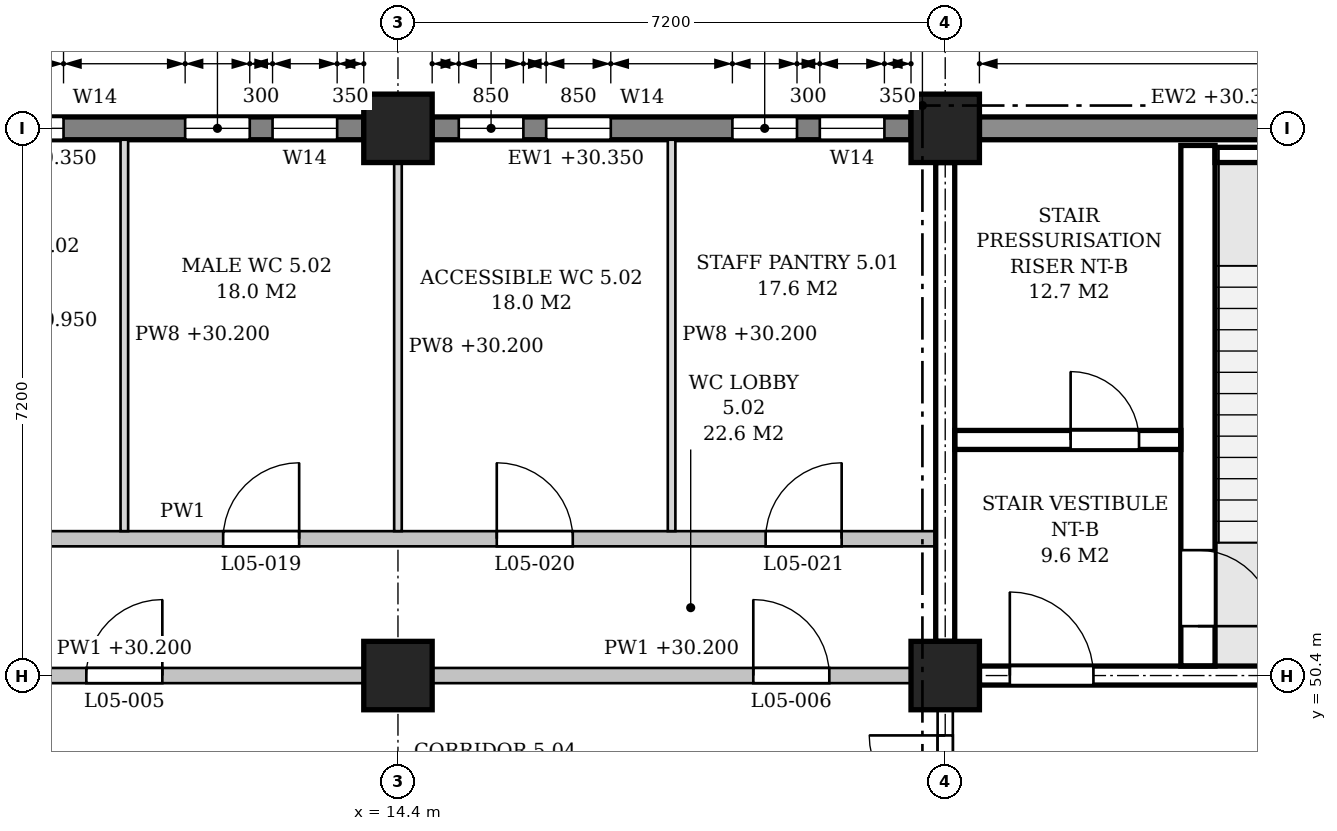
"""IFC4 building model, lengths in metres.
Left out: names, types, materials, properties, quantities, classifications, styles, units other than length and angle.
Written with IfcOpenShell. Run it as: python <this file> out.ifc"""

import sys

from ifc_helpers import new_model, si_unit, direction, frame, frame_2d, origin, origin_2d, place, context, subcontext, project, spatial, polyline, rectangle, outline, extrude, element, fill, save


model = new_model("IFC4")
c1 = context("Model", 3, precision=1e-05, world=origin(), true_north=direction((0.0, 1.0)))
c2 = subcontext(c1, "Body", "Model", "MODEL_VIEW")
j1 = project(units=[si_unit("LENGTHUNIT", "METRE"), si_unit("PLANEANGLEUNIT", "RADIAN")], contexts=[c1])
p1 = place(None, origin())
s1 = spatial("IfcSite", under=j1, at=p1, CompositionType="ELEMENT")
p2 = place(p1, origin())
s2 = spatial("IfcBuilding", under=s1, at=p2, CompositionType="ELEMENT")
p3 = place(p2, frame((0.0, 0.0, 26.4)))
s3 = spatial("IfcBuildingStorey", under=s2, at=p3, CompositionType="ELEMENT", Elevation=26.4)
for number, where, z_axis, x_axis in (
    (1, (14.4, 50.4, 0.0), (0.0, 0.0, 1.0), (1.0, 0.0, 0.0)),
    (2, (14.4, 57.6, 0.0), (0.0, 0.0, 1.0), (1.0, 0.0, 0.0)),
    (3, (21.6, 50.4, 0.0), (0.0, 0.0, 1.0), (1.0, 0.0, 0.0)),
    (4, (21.6, 57.6, 0.0), (0.0, 0.0, 1.0), (1.0, 0.0, 0.0)),
):
    element("IfcColumn", number, at=place(p3, frame(where, z_axis=z_axis, x_axis=x_axis)), inside=s3, PredefinedType="COLUMN", context=c2, shape_type="SweptSolid", body=[
        extrude(rectangle(XDim=0.9, YDim=0.9, at=origin_2d()), origin(), (0.0, 0.0, 1.0), 4.8),
    ])
p4 = place(p3, frame((28.35, 57.6, 0.0), z_axis=(0.0, 0.0, 1.0), x_axis=(-1.0, 0.0, 0.0)))
e5 = element("IfcWall", 5, at=p4, inside=s3, PredefinedType="STANDARD", context=c2, shape_type="SweptSolid", body=[
    extrude(rectangle(XDim=6.3, YDim=0.3, at=frame_2d((3.15, 0.0))), origin(), (0.0, 0.0, 1.0), 3.95),
])
p5 = place(p4, frame((0.9, 0.0, 0.9)))
e6 = element("IfcOpeningElement", 6, at=p5, cuts=e5, PredefinedType="OPENING", context=c2, shape_type="SweptSolid", body=[
    extrude(outline(polyline([(0.0, 0.0), (0.9, 0.0), (0.9, 2.05), (0.45, 2.5), (0.0, 2.05), (0.0, 0.0)])), frame((0.0, 0.16, 0.0), z_axis=(0.0, -1.0, 0.0), x_axis=(1.0, 0.0, 0.0)), (0.0, 0.0, 1.0), 0.32),
])
p6 = place(p3, frame((21.15, 57.6, 0.0), z_axis=(0.0, 0.0, 1.0), x_axis=(-1.0, 0.0, 0.0)))
e7 = element("IfcWall", 7, at=p6, inside=s3, PredefinedType="STANDARD", context=c2, shape_type="SweptSolid", body=[
    extrude(rectangle(XDim=6.3, YDim=0.3, at=frame_2d((3.15, 0.0))), origin(), (0.0, 0.0, 1.0), 3.95),
])
p7 = place(p6, frame((0.35, 0.0, 0.9)))
e8 = element("IfcOpeningElement", 8, at=p7, cuts=e7, PredefinedType="OPENING", context=c2, shape_type="SweptSolid", body=[
    extrude(outline(polyline([(0.0, 0.0), (0.85, 0.0), (0.85, 2.05), (0.425, 2.5), (0.0, 2.05), (0.0, 0.0)])), frame((0.0, 0.16, 0.0), z_axis=(0.0, -1.0, 0.0), x_axis=(1.0, 0.0, 0.0)), (0.0, 0.0, 1.0), 0.32),
])
p8 = place(p6, frame((1.5, 0.0, 0.9)))
e9 = element("IfcOpeningElement", 9, at=p8, cuts=e7, PredefinedType="OPENING", context=c2, shape_type="SweptSolid", body=[
    extrude(outline(polyline([(0.0, 0.0), (0.85, 0.0), (0.85, 2.05), (0.425, 2.5), (0.0, 2.05), (0.0, 0.0)])), frame((0.0, 0.16, 0.0), z_axis=(0.0, -1.0, 0.0), x_axis=(1.0, 0.0, 0.0)), (0.0, 0.0, 1.0), 0.32),
])
p9 = place(p6, frame((3.95, 0.0, 0.9)))
e10 = element("IfcOpeningElement", 10, at=p9, cuts=e7, PredefinedType="OPENING", context=c2, shape_type="SweptSolid", body=[
    extrude(outline(polyline([(0.0, 0.0), (0.85, 0.0), (0.85, 2.05), (0.425, 2.5), (0.0, 2.05), (0.0, 0.0)])), frame((0.0, 0.16, 0.0), z_axis=(0.0, -1.0, 0.0), x_axis=(1.0, 0.0, 0.0)), (0.0, 0.0, 1.0), 0.32),
])
p10 = place(p6, frame((5.1, 0.0, 0.9)))
e11 = element("IfcOpeningElement", 11, at=p10, cuts=e7, PredefinedType="OPENING", context=c2, shape_type="SweptSolid", body=[
    extrude(outline(polyline([(0.0, 0.0), (0.85, 0.0), (0.85, 2.05), (0.425, 2.5), (0.0, 2.05), (0.0, 0.0)])), frame((0.0, 0.16, 0.0), z_axis=(0.0, -1.0, 0.0), x_axis=(1.0, 0.0, 0.0)), (0.0, 0.0, 1.0), 0.32),
])
p11 = place(p3, frame((13.95, 57.6, 0.0), z_axis=(0.0, 0.0, 1.0), x_axis=(-1.0, 0.0, 0.0)))
e12 = element("IfcWall", 12, at=p11, inside=s3, PredefinedType="STANDARD", context=c2, shape_type="SweptSolid", body=[
    extrude(rectangle(XDim=6.3, YDim=0.3, at=frame_2d((3.15, 0.0))), origin(), (0.0, 0.0, 1.0), 3.95),
])
p12 = place(p11, frame((0.35, 0.0, 0.9)))
e13 = element("IfcOpeningElement", 13, at=p12, cuts=e12, PredefinedType="OPENING", context=c2, shape_type="SweptSolid", body=[
    extrude(outline(polyline([(0.0, 0.0), (0.85, 0.0), (0.85, 2.05), (0.425, 2.5), (0.0, 2.05), (0.0, 0.0)])), frame((0.0, 0.16, 0.0), z_axis=(0.0, -1.0, 0.0), x_axis=(1.0, 0.0, 0.0)), (0.0, 0.0, 1.0), 0.32),
])
p13 = place(p11, frame((1.5, 0.0, 0.9)))
e14 = element("IfcOpeningElement", 14, at=p13, cuts=e12, PredefinedType="OPENING", context=c2, shape_type="SweptSolid", body=[
    extrude(outline(polyline([(0.0, 0.0), (0.85, 0.0), (0.85, 2.05), (0.425, 2.5), (0.0, 2.05), (0.0, 0.0)])), frame((0.0, 0.16, 0.0), z_axis=(0.0, -1.0, 0.0), x_axis=(1.0, 0.0, 0.0)), (0.0, 0.0, 1.0), 0.32),
])
p14 = place(p11, frame((3.95, 0.0, 0.9)))
e15 = element("IfcOpeningElement", 15, at=p14, cuts=e12, PredefinedType="OPENING", context=c2, shape_type="SweptSolid", body=[
    extrude(outline(polyline([(0.0, 0.0), (0.85, 0.0), (0.85, 2.05), (0.425, 2.5), (0.0, 2.05), (0.0, 0.0)])), frame((0.0, 0.16, 0.0), z_axis=(0.0, -1.0, 0.0), x_axis=(1.0, 0.0, 0.0)), (0.0, 0.0, 1.0), 0.32),
])
p15 = place(p11, frame((5.1, 0.0, 0.9)))
e16 = element("IfcOpeningElement", 16, at=p15, cuts=e12, PredefinedType="OPENING", context=c2, shape_type="SweptSolid", body=[
    extrude(outline(polyline([(0.0, 0.0), (0.85, 0.0), (0.85, 2.05), (0.425, 2.5), (0.0, 2.05), (0.0, 0.0)])), frame((0.0, 0.16, 0.0), z_axis=(0.0, -1.0, 0.0), x_axis=(1.0, 0.0, 0.0)), (0.0, 0.0, 1.0), 0.32),
])
p16 = place(p3, frame((22.05, 50.4, 0.0), z_axis=(0.0, 0.0, 1.0), x_axis=(1.0, 0.0, 0.0)))
e17 = element("IfcWall", 17, at=p16, inside=s3, PredefinedType="SHEAR", context=c2, shape_type="SweptSolid", body=[
    extrude(rectangle(XDim=6.3, YDim=0.25, at=frame_2d((3.15, 0.0))), origin(), (0.0, 0.0, 1.0), 3.8),
])
p17 = place(p16, frame((0.4, 0.0, 0.0)))
e18 = element("IfcOpeningElement", 18, at=p17, cuts=e17, PredefinedType="OPENING", context=c2, shape_type="SweptSolid", body=[
    extrude(rectangle(XDim=1.1, YDim=2.1, at=frame_2d((0.55, 1.05))), frame((0.0, 0.135, 0.0), z_axis=(0.0, -1.0, 0.0), x_axis=(1.0, 0.0, 0.0)), (0.0, 0.0, 1.0), 0.27),
])
p18 = place(p3, frame((21.6, 50.85, 0.0), z_axis=(0.0, 0.0, 1.0), x_axis=(0.0, 1.0, 0.0)))
e19 = element("IfcWall", 19, at=p18, inside=s3, PredefinedType="SHEAR", context=c2, shape_type="SweptSolid", body=[
    extrude(rectangle(XDim=6.3, YDim=0.25, at=frame_2d((3.15, 0.0))), origin(), (0.0, 0.0, 1.0), 3.8),
])
p19 = place(p3, frame((25.15, 57.25, -0.25), z_axis=(0.0, 0.0, 1.0), x_axis=(1.0, 0.0, 0.0)))
e20 = element("IfcWall", 20, at=p19, inside=s3, PredefinedType="SHEAR", context=c2, shape_type="SweptSolid", body=[
    extrude(rectangle(XDim=1.4, YDim=0.2, at=frame_2d((0.7, 0.0))), origin(), (0.0, 0.0, 1.0), 4.8),
])
p20 = place(p3, frame((24.925, 50.525, 0.0), z_axis=(0.0, 0.0, 1.0), x_axis=(0.0, 1.0, 0.0)))
e21 = element("IfcWall", 21, at=p20, inside=s3, PredefinedType="SHEAR", context=c2, shape_type="SweptSolid", body=[
    extrude(rectangle(XDim=6.85, YDim=0.45, at=frame_2d((3.425, 0.0))), origin(), (0.0, 0.0, 1.0), 4.55),
])
p21 = place(p20, frame((0.525, 0.0, 0.0)))
e22 = element("IfcOpeningElement", 22, at=p21, cuts=e21, PredefinedType="OPENING", context=c2, shape_type="SweptSolid", body=[
    extrude(rectangle(XDim=1.0, YDim=2.1, at=frame_2d((0.5, 1.05))), frame((0.0, 0.235, 0.0), z_axis=(0.0, -1.0, 0.0), x_axis=(1.0, 0.0, 0.0)), (0.0, 0.0, 1.0), 0.47),
])
p22 = place(p3, frame((21.725, 53.5, 0.0), z_axis=(0.0, 0.0, 1.0), x_axis=(1.0, 0.0, 0.0)))
e23 = element("IfcWall", 23, at=p22, inside=s3, PredefinedType="SHEAR", context=c2, shape_type="SweptSolid", body=[
    extrude(rectangle(XDim=2.975, YDim=0.25, at=frame_2d((1.487, 0.0))), origin(), (0.0, 0.0, 1.0), 4.55),
])
p23 = place(p22, frame((1.525, 0.0, 0.0)))
e24 = element("IfcOpeningElement", 24, at=p23, cuts=e23, PredefinedType="OPENING", context=c2, shape_type="SweptSolid", body=[
    extrude(rectangle(XDim=0.9, YDim=2.1, at=frame_2d((0.45, 1.05))), frame((0.0, 0.135, 0.0), z_axis=(0.0, -1.0, 0.0), x_axis=(1.0, 0.0, 0.0)), (0.0, 0.0, 1.0), 0.27),
])
p24 = place(p3, frame((7.65, 50.4, 0.0), z_axis=(0.0, 0.0, 1.0), x_axis=(1.0, 0.0, 0.0)))
e25 = element("IfcWall", 25, at=p24, inside=s3, PredefinedType="PARTITIONING", context=c2, shape_type="SweptSolid", body=[
    extrude(rectangle(XDim=6.3, YDim=0.2, at=frame_2d((3.15, 0.0))), origin(), (0.0, 0.0, 1.0), 3.8),
])
p25 = place(p24, frame((2.65, 0.0, 0.0)))
e26 = element("IfcOpeningElement", 26, at=p25, cuts=e25, PredefinedType="OPENING", context=c2, shape_type="SweptSolid", body=[
    extrude(rectangle(XDim=1.0, YDim=2.1, at=frame_2d((0.5, 1.05))), frame((0.0, 0.11, 0.0), z_axis=(0.0, -1.0, 0.0), x_axis=(1.0, 0.0, 0.0)), (0.0, 0.0, 1.0), 0.22),
])
p26 = place(p3, frame((14.85, 50.4, 0.0), z_axis=(0.0, 0.0, 1.0), x_axis=(1.0, 0.0, 0.0)))
e27 = element("IfcWall", 27, at=p26, inside=s3, PredefinedType="PARTITIONING", context=c2, shape_type="SweptSolid", body=[
    extrude(rectangle(XDim=6.3, YDim=0.2, at=frame_2d((3.15, 0.0))), origin(), (0.0, 0.0, 1.0), 3.8),
])
p27 = place(p26, frame((4.225, 0.0, 0.0)))
e28 = element("IfcOpeningElement", 28, at=p27, cuts=e27, PredefinedType="OPENING", context=c2, shape_type="SweptSolid", body=[
    extrude(rectangle(XDim=1.0, YDim=2.1, at=frame_2d((0.5, 1.05))), frame((0.0, 0.11, 0.0), z_axis=(0.0, -1.0, 0.0), x_axis=(1.0, 0.0, 0.0)), (0.0, 0.0, 1.0), 0.22),
])
p28 = place(p3, frame((7.325, 52.2, 0.0), z_axis=(0.0, 0.0, 1.0), x_axis=(1.0, 0.0, 0.0)))
e29 = element("IfcWall", 29, at=p28, inside=s3, PredefinedType="PARTITIONING", context=c2, shape_type="SweptSolid", body=[
    extrude(outline(polyline([(0.0, 0.0), (14.15, 0.0), (14.15, 3.8), (14.025, 3.8), (14.025, 4.55), (7.325, 4.55), (7.325, 3.8), (6.825, 3.8), (6.825, 4.55), (0.125, 4.55), (0.125, 3.8), (0.0, 3.8), (0.0, 0.0)])), frame((0.0, 0.1, 0.0), z_axis=(0.0, -1.0, 0.0), x_axis=(1.0, 0.0, 0.0)), (0.0, 0.0, 1.0), 0.2),
])
p29 = place(p28, frame((1.238, 0.0, 0.0)))
e30 = element("IfcOpeningElement", 30, at=p29, cuts=e29, PredefinedType="OPENING", context=c2, shape_type="SweptSolid", body=[
    extrude(rectangle(XDim=1.0, YDim=2.1, at=frame_2d((0.5, 1.05))), frame((0.0, 0.11, 0.0), z_axis=(0.0, -1.0, 0.0), x_axis=(1.0, 0.0, 0.0)), (0.0, 0.0, 1.0), 0.22),
])
p30 = place(p28, frame((4.775, 0.0, 0.0)))
e31 = element("IfcOpeningElement", 31, at=p30, cuts=e29, PredefinedType="OPENING", context=c2, shape_type="SweptSolid", body=[
    extrude(rectangle(XDim=1.0, YDim=2.1, at=frame_2d((0.5, 1.05))), frame((0.0, 0.11, 0.0), z_axis=(0.0, -1.0, 0.0), x_axis=(1.0, 0.0, 0.0)), (0.0, 0.0, 1.0), 0.22),
])
p31 = place(p28, frame((8.375, 0.0, 0.0)))
e32 = element("IfcOpeningElement", 32, at=p31, cuts=e29, PredefinedType="OPENING", context=c2, shape_type="SweptSolid", body=[
    extrude(rectangle(XDim=1.0, YDim=2.1, at=frame_2d((0.5, 1.05))), frame((0.0, 0.11, 0.0), z_axis=(0.0, -1.0, 0.0), x_axis=(1.0, 0.0, 0.0)), (0.0, 0.0, 1.0), 0.22),
])
p32 = place(p28, frame((11.913, 0.0, 0.0)))
e33 = element("IfcOpeningElement", 33, at=p32, cuts=e29, PredefinedType="OPENING", context=c2, shape_type="SweptSolid", body=[
    extrude(rectangle(XDim=1.0, YDim=2.1, at=frame_2d((0.5, 1.05))), frame((0.0, 0.11, 0.0), z_axis=(0.0, -1.0, 0.0), x_axis=(1.0, 0.0, 0.0)), (0.0, 0.0, 1.0), 0.22),
])
p33 = place(p3, frame((10.8, 52.3, 0.0), z_axis=(0.0, 0.0, 1.0), x_axis=(0.0, 1.0, 0.0)))
e34 = element("IfcWall", 34, at=p33, inside=s3, PredefinedType="PARTITIONING", context=c2, shape_type="SweptSolid", body=[
    extrude(rectangle(XDim=5.15, YDim=0.1, at=frame_2d((2.575, 0.0))), origin(), (0.0, 0.0, 1.0), 3.8),
])
p34 = place(p3, frame((14.4, 52.3, 0.0), z_axis=(0.0, 0.0, 1.0), x_axis=(0.0, 1.0, 0.0)))
e35 = element("IfcWall", 35, at=p34, inside=s3, PredefinedType="PARTITIONING", context=c2, shape_type="SweptSolid", body=[
    extrude(rectangle(XDim=4.85, YDim=0.1, at=frame_2d((2.425, 0.0))), origin(), (0.0, 0.0, 1.0), 3.8),
])
p35 = place(p3, frame((18.0, 52.3, 0.0), z_axis=(0.0, 0.0, 1.0), x_axis=(0.0, 1.0, 0.0)))
e36 = element("IfcWall", 36, at=p35, inside=s3, PredefinedType="PARTITIONING", context=c2, shape_type="SweptSolid", body=[
    extrude(rectangle(XDim=5.15, YDim=0.1, at=frame_2d((2.575, 0.0))), origin(), (0.0, 0.0, 1.0), 3.8),
])
p36 = place(p3, frame((21.6, 47.275, 0.0), z_axis=(0.0, 0.0, 1.0), x_axis=(0.0, 1.0, 0.0)))
e37 = element("IfcWall", 37, at=p36, inside=s3, PredefinedType="PARTITIONING", context=c2, shape_type="SweptSolid", body=[
    extrude(rectangle(XDim=2.675, YDim=0.2, at=frame_2d((1.337, 0.0))), origin(), (0.0, 0.0, 1.0), 3.8),
])
p37 = place(p36, frame((0.337, 0.0, 0.0)))
e38 = element("IfcOpeningElement", 38, at=p37, cuts=e37, PredefinedType="OPENING", context=c2, shape_type="SweptSolid", body=[
    extrude(rectangle(XDim=2.0, YDim=2.4, at=frame_2d((1.0, 1.2))), frame((0.0, 0.11, 0.0), z_axis=(0.0, -1.0, 0.0), x_axis=(1.0, 0.0, 0.0)), (0.0, 0.0, 1.0), 0.22),
])
p38 = place(p7, origin())
e39 = element("IfcWindow", 39, at=p38, inside=s3, PartitioningType="SINGLE_PANEL", PredefinedType="WINDOW", context=c2, shape_type="SweptSolid", body=[
    extrude(outline(polyline([(0.0, 0.0), (0.85, 0.0), (0.85, 2.05), (0.425, 2.5), (0.0, 2.05), (0.0, 0.0)])), frame((0.0, 0.03, 0.0), z_axis=(0.0, -1.0, 0.0), x_axis=(1.0, 0.0, 0.0)), (0.0, 0.0, 1.0), 0.06),
])
fill(e8, e39)
p39 = place(p8, origin())
e40 = element("IfcWindow", 40, at=p39, inside=s3, PartitioningType="SINGLE_PANEL", PredefinedType="WINDOW", context=c2, shape_type="SweptSolid", body=[
    extrude(outline(polyline([(0.0, 0.0), (0.85, 0.0), (0.85, 2.05), (0.425, 2.5), (0.0, 2.05), (0.0, 0.0)])), frame((0.0, 0.03, 0.0), z_axis=(0.0, -1.0, 0.0), x_axis=(1.0, 0.0, 0.0)), (0.0, 0.0, 1.0), 0.06),
])
fill(e9, e40)
p40 = place(p9, origin())
e41 = element("IfcWindow", 41, at=p40, inside=s3, PartitioningType="SINGLE_PANEL", PredefinedType="WINDOW", context=c2, shape_type="SweptSolid", body=[
    extrude(outline(polyline([(0.0, 0.0), (0.85, 0.0), (0.85, 2.05), (0.425, 2.5), (0.0, 2.05), (0.0, 0.0)])), frame((0.0, 0.03, 0.0), z_axis=(0.0, -1.0, 0.0), x_axis=(1.0, 0.0, 0.0)), (0.0, 0.0, 1.0), 0.06),
])
fill(e10, e41)
p41 = place(p10, origin())
e42 = element("IfcWindow", 42, at=p41, inside=s3, PartitioningType="SINGLE_PANEL", PredefinedType="WINDOW", context=c2, shape_type="SweptSolid", body=[
    extrude(outline(polyline([(0.0, 0.0), (0.85, 0.0), (0.85, 2.05), (0.425, 2.5), (0.0, 2.05), (0.0, 0.0)])), frame((0.0, 0.03, 0.0), z_axis=(0.0, -1.0, 0.0), x_axis=(1.0, 0.0, 0.0)), (0.0, 0.0, 1.0), 0.06),
])
fill(e11, e42)
p42 = place(p12, origin())
e43 = element("IfcWindow", 43, at=p42, inside=s3, PartitioningType="SINGLE_PANEL", PredefinedType="WINDOW", context=c2, shape_type="SweptSolid", body=[
    extrude(outline(polyline([(0.0, 0.0), (0.85, 0.0), (0.85, 2.05), (0.425, 2.5), (0.0, 2.05), (0.0, 0.0)])), frame((0.0, 0.03, 0.0), z_axis=(0.0, -1.0, 0.0), x_axis=(1.0, 0.0, 0.0)), (0.0, 0.0, 1.0), 0.06),
])
fill(e13, e43)
p43 = place(p13, origin())
e44 = element("IfcWindow", 44, at=p43, inside=s3, PartitioningType="SINGLE_PANEL", PredefinedType="WINDOW", context=c2, shape_type="SweptSolid", body=[
    extrude(outline(polyline([(0.0, 0.0), (0.85, 0.0), (0.85, 2.05), (0.425, 2.5), (0.0, 2.05), (0.0, 0.0)])), frame((0.0, 0.03, 0.0), z_axis=(0.0, -1.0, 0.0), x_axis=(1.0, 0.0, 0.0)), (0.0, 0.0, 1.0), 0.06),
])
fill(e14, e44)
p44 = place(p14, origin())
e45 = element("IfcWindow", 45, at=p44, inside=s3, PartitioningType="SINGLE_PANEL", PredefinedType="WINDOW", context=c2, shape_type="SweptSolid", body=[
    extrude(outline(polyline([(0.0, 0.0), (0.85, 0.0), (0.85, 2.05), (0.425, 2.5), (0.0, 2.05), (0.0, 0.0)])), frame((0.0, 0.03, 0.0), z_axis=(0.0, -1.0, 0.0), x_axis=(1.0, 0.0, 0.0)), (0.0, 0.0, 1.0), 0.06),
])
fill(e15, e45)
p45 = place(p21, frame((1.0, 0.0, 0.0), z_axis=(0.0, 0.0, 1.0), x_axis=(-1.0, 0.0, 0.0)))
e46 = element("IfcDoor", 46, at=p45, inside=s3, OperationType="SINGLE_SWING_RIGHT", PredefinedType="DOOR", context=c2, shape_type="SweptSolid", body=[
    extrude(rectangle(XDim=1.0, YDim=2.1, at=frame_2d((0.5, 1.05))), frame((0.0, 0.025, 0.0), z_axis=(0.0, -1.0, 0.0), x_axis=(1.0, 0.0, 0.0)), (0.0, 0.0, 1.0), 0.05),
])
fill(e22, e46)
p46 = place(p17, origin())
e47 = element("IfcDoor", 47, at=p46, inside=s3, OperationType="SINGLE_SWING_LEFT", PredefinedType="DOOR", context=c2, shape_type="SweptSolid", body=[
    extrude(rectangle(XDim=1.1, YDim=2.1, at=frame_2d((0.55, 1.05))), frame((0.0, 0.025, 0.0), z_axis=(0.0, -1.0, 0.0), x_axis=(1.0, 0.0, 0.0)), (0.0, 0.0, 1.0), 0.05),
])
fill(e18, e47)
p47 = place(p23, origin())
e48 = element("IfcDoor", 48, at=p47, inside=s3, OperationType="SINGLE_SWING_LEFT", PredefinedType="DOOR", context=c2, shape_type="SweptSolid", body=[
    extrude(rectangle(XDim=0.9, YDim=2.1, at=frame_2d((0.45, 1.05))), frame((0.0, 0.025, 0.0), z_axis=(0.0, -1.0, 0.0), x_axis=(1.0, 0.0, 0.0)), (0.0, 0.0, 1.0), 0.05),
])
fill(e24, e48)
p48 = place(p37, origin())
e49 = element("IfcDoor", 49, at=p48, inside=s3, OperationType="DOUBLE_DOOR_SINGLE_SWING", PredefinedType="DOOR", context=c2, shape_type="SweptSolid", body=[
    extrude(rectangle(XDim=2.0, YDim=2.4, at=frame_2d((1.0, 1.2))), frame((0.0, 0.025, 0.0), z_axis=(0.0, -1.0, 0.0), x_axis=(1.0, 0.0, 0.0)), (0.0, 0.0, 1.0), 0.05),
])
fill(e38, e49)
p49 = place(p25, origin())
e50 = element("IfcDoor", 50, at=p49, inside=s3, OperationType="SINGLE_SWING_RIGHT", PredefinedType="DOOR", context=c2, shape_type="SweptSolid", body=[
    extrude(rectangle(XDim=1.0, YDim=2.1, at=frame_2d((0.5, 1.05))), frame((0.0, 0.025, 0.0), z_axis=(0.0, -1.0, 0.0), x_axis=(1.0, 0.0, 0.0)), (0.0, 0.0, 1.0), 0.05),
])
fill(e26, e50)
p50 = place(p27, origin())
e51 = element("IfcDoor", 51, at=p50, inside=s3, OperationType="SINGLE_SWING_LEFT", PredefinedType="DOOR", context=c2, shape_type="SweptSolid", body=[
    extrude(rectangle(XDim=1.0, YDim=2.1, at=frame_2d((0.5, 1.05))), frame((0.0, 0.025, 0.0), z_axis=(0.0, -1.0, 0.0), x_axis=(1.0, 0.0, 0.0)), (0.0, 0.0, 1.0), 0.05),
])
fill(e28, e51)
p51 = place(p30, origin())
e52 = element("IfcDoor", 52, at=p51, inside=s3, OperationType="SINGLE_SWING_RIGHT", PredefinedType="DOOR", context=c2, shape_type="SweptSolid", body=[
    extrude(rectangle(XDim=1.0, YDim=2.1, at=frame_2d((0.5, 1.05))), frame((0.0, 0.025, 0.0), z_axis=(0.0, -1.0, 0.0), x_axis=(1.0, 0.0, 0.0)), (0.0, 0.0, 1.0), 0.05),
])
fill(e31, e52)
p52 = place(p31, origin())
e53 = element("IfcDoor", 53, at=p52, inside=s3, OperationType="SINGLE_SWING_LEFT", PredefinedType="DOOR", context=c2, shape_type="SweptSolid", body=[
    extrude(rectangle(XDim=1.0, YDim=2.1, at=frame_2d((0.5, 1.05))), frame((0.0, 0.025, 0.0), z_axis=(0.0, -1.0, 0.0), x_axis=(1.0, 0.0, 0.0)), (0.0, 0.0, 1.0), 0.05),
])
fill(e32, e53)
p53 = place(p32, origin())
e54 = element("IfcDoor", 54, at=p53, inside=s3, OperationType="SINGLE_SWING_RIGHT", PredefinedType="DOOR", context=c2, shape_type="SweptSolid", body=[
    extrude(rectangle(XDim=1.0, YDim=2.1, at=frame_2d((0.5, 1.05))), frame((0.0, 0.025, 0.0), z_axis=(0.0, -1.0, 0.0), x_axis=(1.0, 0.0, 0.0)), (0.0, 0.0, 1.0), 0.05),
])
fill(e33, e54)
save(model, sys.argv[1])
